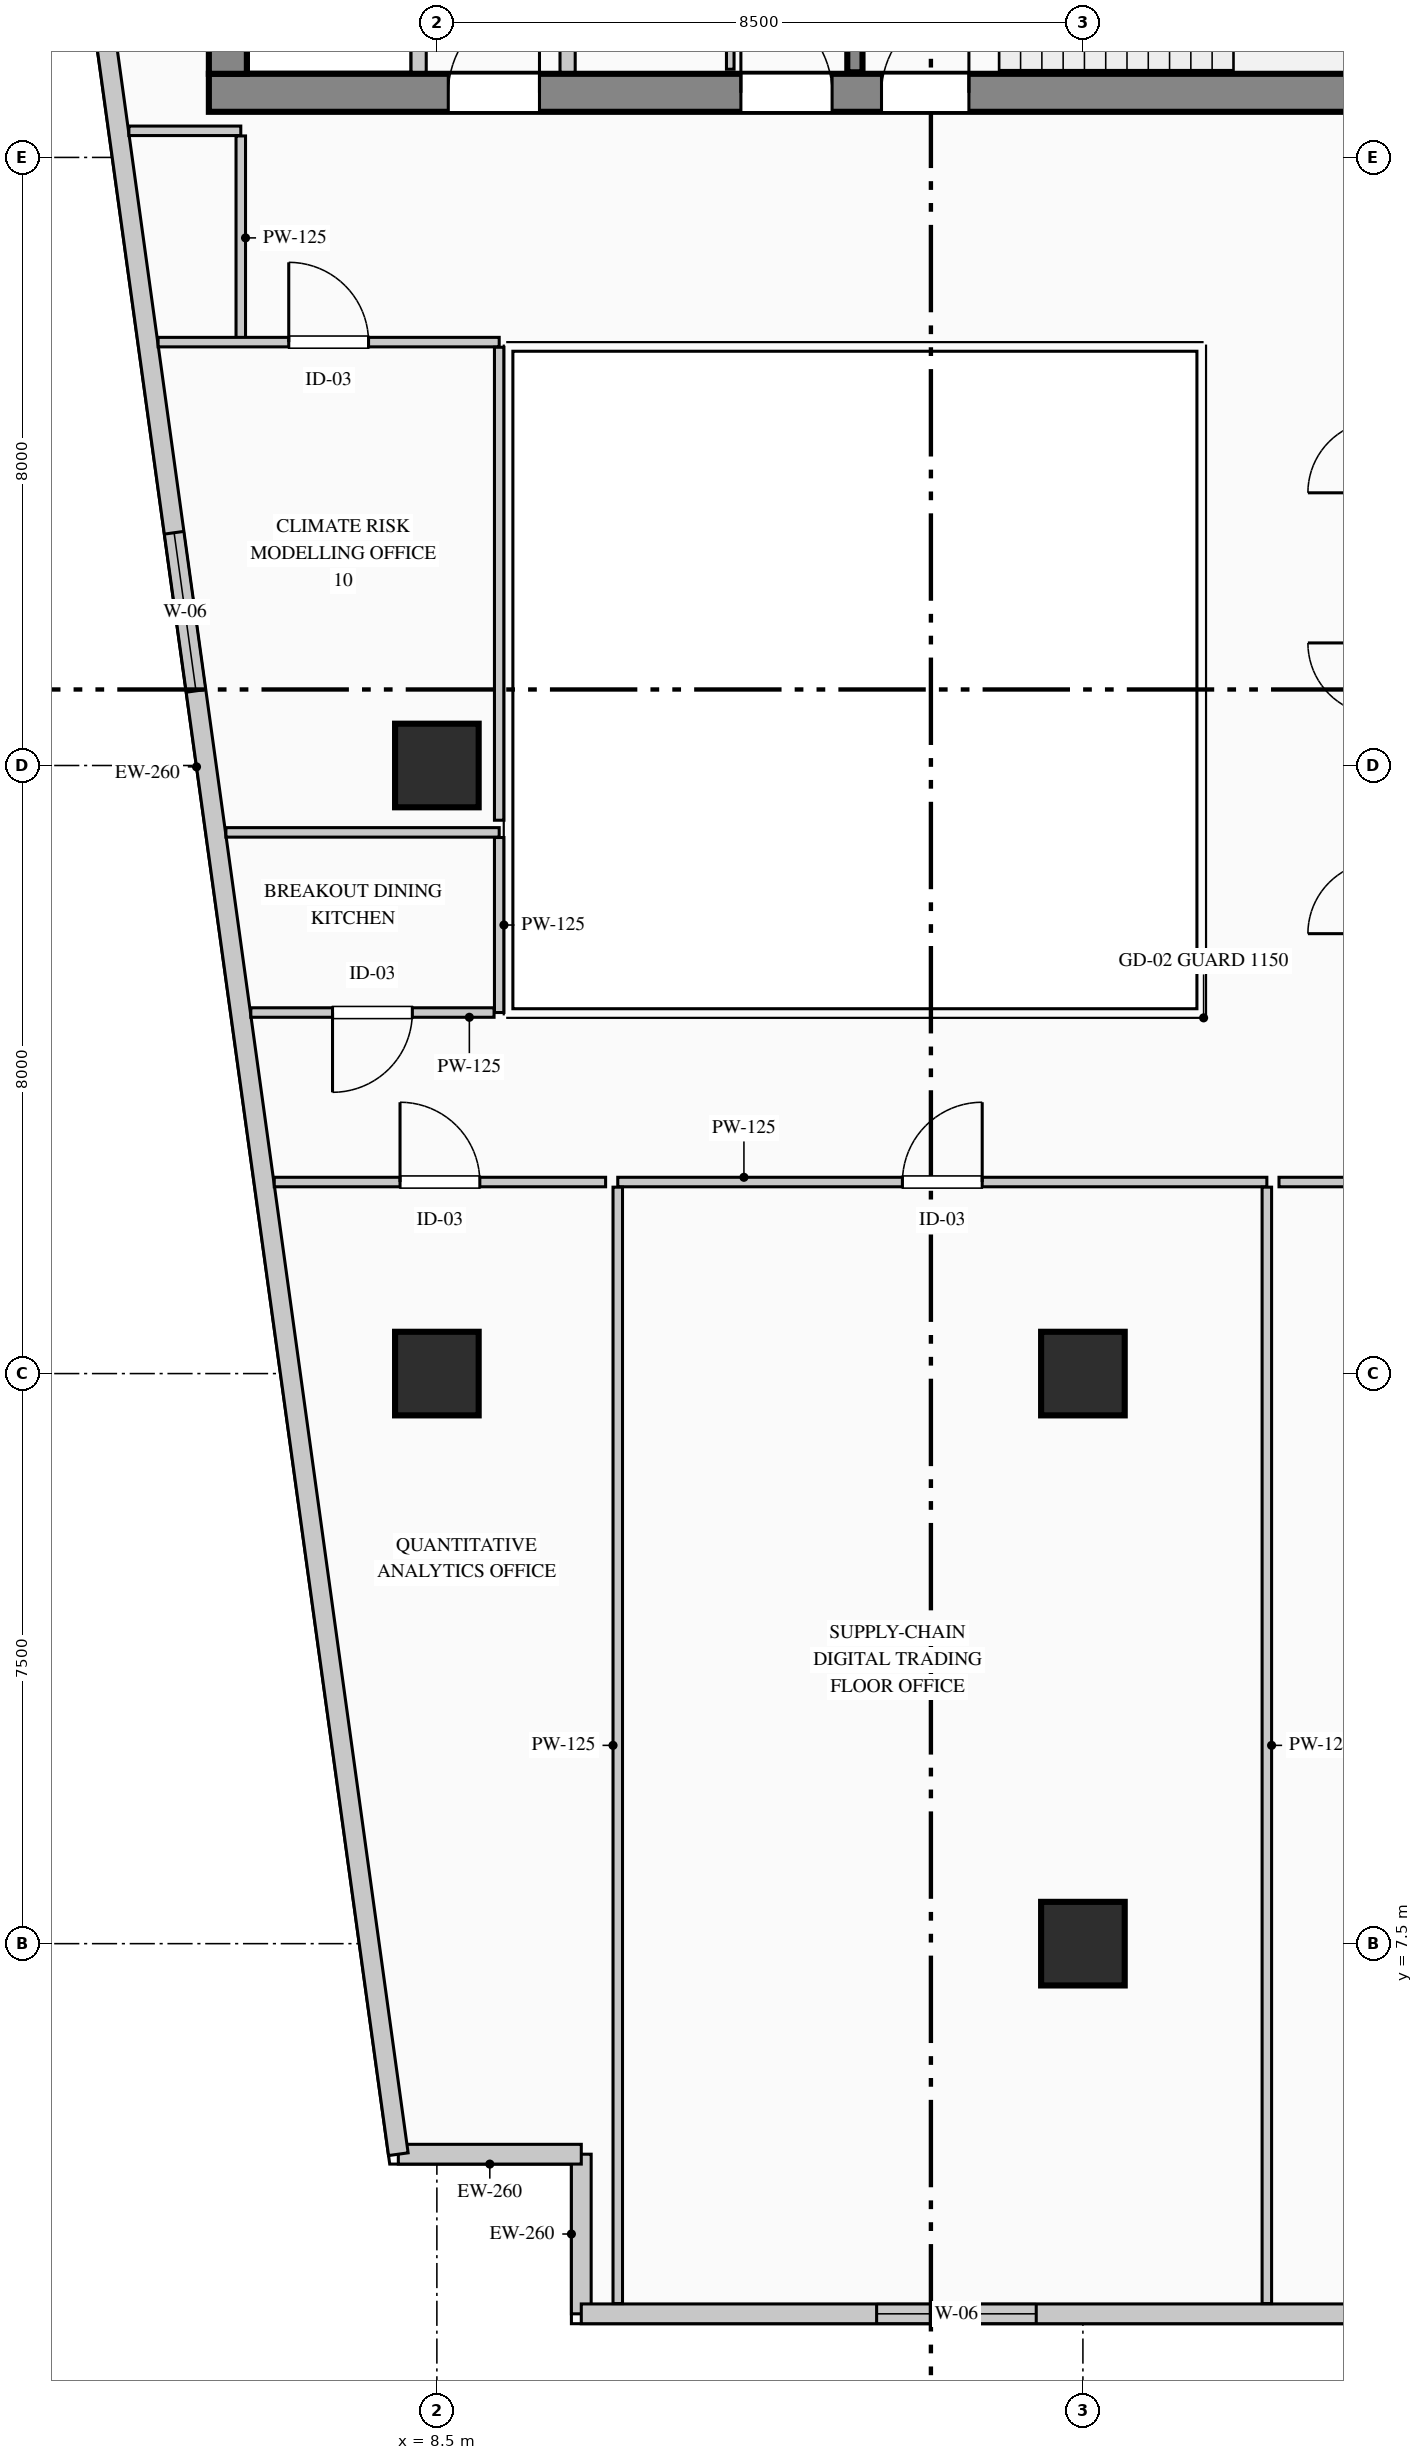
"""IFC4 building model, lengths in metres.
Left out: names, types, materials, properties, quantities, classifications, styles, units other than length and angle.
Written with IfcOpenShell. Run it as: python <this file> out.ifc"""

import sys

from ifc_helpers import new_model, si_unit, direction, frame, frame_2d, origin, origin_2d, place, context, subcontext, project, spatial, rectangle, extrude, element, fill, save


model = new_model("IFC4")
c1 = context("Model", 3, precision=1e-05, world=origin(), true_north=direction((0.0, 1.0)))
c2 = subcontext(c1, "Body", "Model", "MODEL_VIEW")
j1 = project(units=[si_unit("LENGTHUNIT", "METRE"), si_unit("PLANEANGLEUNIT", "RADIAN")], contexts=[c1])
p1 = place(None, origin())
s1 = spatial("IfcSite", under=j1, at=p1, CompositionType="ELEMENT")
p2 = place(p1, origin())
s2 = spatial("IfcBuilding", under=s1, at=p2, CompositionType="ELEMENT")
p3 = place(p2, frame((0.0, 0.0, 154.85)))
s3 = spatial("IfcBuildingStorey", under=s2, at=p3, CompositionType="ELEMENT", Elevation=154.85)
p4 = place(p3, frame((5.5, 31.85, 0.0), z_axis=(0.0, 0.0, 1.0), x_axis=(1.0, 0.0, 0.0)))
e1 = element("IfcWall", 1, at=p4, inside=s3, PredefinedType="SHEAR", context=c2, shape_type="SweptSolid", body=[
    extrude(rectangle(XDim=17.85, YDim=0.5, at=frame_2d((8.925, 0.0))), origin(), (0.0, 0.0, 1.0), 3.95),
])
p5 = place(p4, frame((3.15, 0.0, 0.0)))
e2 = element("IfcOpeningElement", 2, at=p5, cuts=e1, PredefinedType="OPENING", context=c2, shape_type="SweptSolid", body=[
    extrude(rectangle(XDim=1.2, YDim=2.2, at=frame_2d((0.6, 1.1))), frame((0.0, 0.26, 0.0), z_axis=(0.0, -1.0, 0.0), x_axis=(1.0, 0.0, 0.0)), (0.0, 0.0, 1.0), 0.52),
])
p6 = place(p4, frame((7.0, 0.0, 0.0)))
e3 = element("IfcOpeningElement", 3, at=p6, cuts=e1, PredefinedType="OPENING", context=c2, shape_type="SweptSolid", body=[
    extrude(rectangle(XDim=1.2, YDim=2.2, at=frame_2d((0.6, 1.1))), frame((0.0, 0.26, 0.0), z_axis=(0.0, -1.0, 0.0), x_axis=(1.0, 0.0, 0.0)), (0.0, 0.0, 1.0), 0.52),
])
p7 = place(p4, frame((8.85, 0.0, 0.0)))
e4 = element("IfcOpeningElement", 4, at=p7, cuts=e1, PredefinedType="OPENING", context=c2, shape_type="SweptSolid", body=[
    extrude(rectangle(XDim=1.15, YDim=2.2, at=frame_2d((0.575, 1.1))), frame((0.0, 0.26, 0.0), z_axis=(0.0, -1.0, 0.0), x_axis=(1.0, 0.0, 0.0)), (0.0, 0.0, 1.0), 0.52),
])
p8 = place(p4, frame((15.95, 0.0, 0.0)))
e5 = element("IfcOpeningElement", 5, at=p8, cuts=e1, PredefinedType="OPENING", context=c2, shape_type="SweptSolid", body=[
    extrude(rectangle(XDim=1.2, YDim=2.2, at=frame_2d((0.6, 1.1))), frame((0.0, 0.26, 0.0), z_axis=(0.0, -1.0, 0.0), x_axis=(1.0, 0.0, 0.0)), (0.0, 0.0, 1.0), 0.52),
])
p9 = place(p3, frame((5.75, 32.1, 0.0), z_axis=(0.0, 0.0, 1.0), x_axis=(0.0, 1.0, 0.0)))
e6 = element("IfcWall", 6, at=p9, inside=s3, PredefinedType="SHEAR", context=c2, shape_type="SweptSolid", body=[
    extrude(rectangle(XDim=8.3, YDim=0.5, at=frame_2d((4.15, 0.0))), origin(), (0.0, 0.0, 1.0), 3.95),
])
p10 = place(p3, frame((14.0, 32.12, 0.0), z_axis=(0.0, 0.0, 1.0), x_axis=(0.0, 1.0, 0.0)))
e7 = element("IfcWall", 7, at=p10, inside=s3, PredefinedType="SHEAR", context=c2, shape_type="SweptSolid", body=[
    extrude(rectangle(XDim=8.26, YDim=0.2, at=frame_2d((4.13, 0.0))), origin(), (0.0, 0.0, 1.0), 3.95),
])
p11 = place(p10, frame((4.46, 0.0, 0.0)))
e8 = element("IfcOpeningElement", 8, at=p11, cuts=e7, PredefinedType="OPENING", context=c2, shape_type="SweptSolid", body=[
    extrude(rectangle(XDim=1.15, YDim=2.2, at=frame_2d((0.575, 1.1))), frame((0.0, 0.11, 0.0), z_axis=(0.0, -1.0, 0.0), x_axis=(1.0, 0.0, 0.0)), (0.0, 0.0, 1.0), 0.22),
])
for number, where, z_axis, x_axis in (
    (9, (8.5, 15.0, 0.0), (0.0, 0.0, 1.0), (1.0, 0.0, 0.0)),
    (10, (8.5, 23.0, 0.0), (0.0, 0.0, 1.0), (1.0, 0.0, 0.0)),
    (11, (17.0, 7.5, 0.0), (0.0, 0.0, 1.0), (1.0, 0.0, 0.0)),
    (12, (17.0, 15.0, 0.0), (0.0, 0.0, 1.0), (1.0, 0.0, 0.0)),
):
    element("IfcColumn", number, at=place(p3, frame(where, z_axis=z_axis, x_axis=x_axis)), inside=s3, PredefinedType="COLUMN", context=c2, shape_type="SweptSolid", body=[
        extrude(rectangle(XDim=1.1, YDim=1.1, at=origin_2d()), origin(), (0.0, 0.0, 1.0), 3.95),
    ])
p12 = place(p3, frame((10.4, 2.63, 0.0), z_axis=(0.0, 0.0, 1.0), x_axis=(0.0, 1.0, 0.0)))
e13 = element("IfcWall", 13, at=p12, inside=s3, PredefinedType="STANDARD", context=c2, shape_type="SweptSolid", body=[
    extrude(rectangle(XDim=2.1, YDim=0.26, at=frame_2d((1.05, 0.0))), origin(), (0.0, 0.0, 1.0), 3.69),
])
p13 = place(p3, frame((10.4, 4.73, 0.0), z_axis=(0.0, 0.0, 1.0), x_axis=(-1.0, 0.0, 0.0)))
e14 = element("IfcWall", 14, at=p13, inside=s3, PredefinedType="STANDARD", context=c2, shape_type="SweptSolid", body=[
    extrude(rectangle(XDim=2.407, YDim=0.26, at=frame_2d((1.204, 0.0))), origin(), (0.0, 0.0, 1.0), 3.69),
])
p14 = place(p3, frame((7.993, 4.73, 0.0), z_axis=(0.0, 0.0, 1.0), x_axis=(-0.136989009016, 0.990572567462, 0.0)))
e15 = element("IfcWall", 15, at=p14, inside=s3, PredefinedType="STANDARD", context=c2, shape_type="SweptSolid", body=[
    extrude(rectangle(XDim=36.888, YDim=0.26, at=frame_2d((18.444, 0.0))), origin(), (0.0, 0.0, 1.0), 3.69),
])
p15 = place(p14, frame((19.435, 0.0, 0.9)))
e16 = element("IfcOpeningElement", 16, at=p15, cuts=e15, PredefinedType="OPENING", context=c2, shape_type="SweptSolid", body=[
    extrude(rectangle(XDim=2.1, YDim=2.0, at=frame_2d((1.05, 1.0))), frame((0.0, 0.14, 0.0), z_axis=(0.0, -1.0, 0.0), x_axis=(1.0, 0.0, 0.0)), (0.0, 0.0, 1.0), 0.28),
])
p16 = place(p3, frame((24.11, 2.63, 0.0), z_axis=(0.0, 0.0, 1.0), x_axis=(-1.0, 0.0, 0.0)))
e17 = element("IfcWall", 17, at=p16, inside=s3, PredefinedType="STANDARD", context=c2, shape_type="SweptSolid", body=[
    extrude(rectangle(XDim=13.71, YDim=0.26, at=frame_2d((6.855, 0.0))), origin(), (0.0, 0.0, 1.0), 3.69),
])
p17 = place(p16, frame((7.724, 0.0, 0.9)))
e18 = element("IfcOpeningElement", 18, at=p17, cuts=e17, PredefinedType="OPENING", context=c2, shape_type="SweptSolid", body=[
    extrude(rectangle(XDim=2.1, YDim=2.0, at=frame_2d((1.05, 1.0))), frame((0.0, 0.14, 0.0), z_axis=(0.0, -1.0, 0.0), x_axis=(1.0, 0.0, 0.0)), (0.0, 0.0, 1.0), 0.28),
])
p18 = place(p3, frame((8.26, 32.12, 0.0), z_axis=(0.0, 0.0, 1.0), x_axis=(0.0, 1.0, 0.0)))
e19 = element("IfcWall", 19, at=p18, inside=s3, PredefinedType="PARTITIONING", context=c2, shape_type="SweptSolid", body=[
    extrude(rectangle(XDim=7.5, YDim=0.2, at=frame_2d((3.75, 0.0))), origin(), (0.0, 0.0, 1.0), 3.69),
])
p19 = place(p3, frame((10.22, 32.12, 0.0), z_axis=(0.0, 0.0, 1.0), x_axis=(0.0, 1.0, 0.0)))
e20 = element("IfcWall", 20, at=p19, inside=s3, PredefinedType="PARTITIONING", context=c2, shape_type="SweptSolid", body=[
    extrude(rectangle(XDim=8.26, YDim=0.2, at=frame_2d((4.13, 0.0))), origin(), (0.0, 0.0, 1.0), 3.69),
])
p20 = place(p3, frame((12.36, 32.16, 0.0), z_axis=(0.0, 0.0, 1.0), x_axis=(0.0, 1.0, 0.0)))
e21 = element("IfcWall", 21, at=p20, inside=s3, PredefinedType="PARTITIONING", context=c2, shape_type="SweptSolid", body=[
    extrude(rectangle(XDim=1.62, YDim=0.1, at=frame_2d((0.81, 0.0))), origin(), (0.0, 0.0, 1.0), 3.69),
])
p21 = place(p20, frame((0.38, 0.0, 0.0)))
e22 = element("IfcOpeningElement", 22, at=p21, cuts=e21, PredefinedType="OPENING", context=c2, shape_type="SweptSolid", body=[
    extrude(rectangle(XDim=0.85, YDim=2.1, at=frame_2d((0.425, 1.05))), frame((0.0, 0.06, 0.0), z_axis=(0.0, -1.0, 0.0), x_axis=(1.0, 0.0, 0.0)), (0.0, 0.0, 1.0), 0.12),
])
p22 = place(p3, frame((10.88, 17.52, 0.0), z_axis=(0.0, 0.0, 1.0), x_axis=(1.0, 0.0, 0.0)))
e23 = element("IfcWall", 23, at=p22, inside=s3, PredefinedType="PARTITIONING", context=c2, shape_type="SweptSolid", body=[
    extrude(rectangle(XDim=8.54, YDim=0.125, at=frame_2d((4.27, 0.0))), origin(), (0.0, 0.0, 1.0), 3.69),
])
p23 = place(p22, frame((3.745, 0.0, 0.0)))
e24 = element("IfcOpeningElement", 24, at=p23, cuts=e23, PredefinedType="OPENING", context=c2, shape_type="SweptSolid", body=[
    extrude(rectangle(XDim=1.05, YDim=2.15, at=frame_2d((0.525, 1.075))), frame((0.0, 0.073, 0.0), z_axis=(0.0, -1.0, 0.0), x_axis=(1.0, 0.0, 0.0)), (0.0, 0.0, 1.0), 0.145),
])
for number, where, z_axis, x_axis in (
    (25, (19.42, 17.452, 0.0), (0.0, 0.0, 1.0), (0.0, -1.0, 0.0)),
    (26, (10.88, 2.765, 0.0), (0.0, 0.0, 1.0), (0.0, 1.0, 0.0)),
):
    element("IfcWall", number, at=place(p3, frame(where, z_axis=z_axis, x_axis=x_axis)), inside=s3, PredefinedType="PARTITIONING", context=c2, shape_type="SweptSolid", body=[
        extrude(rectangle(XDim=14.688, YDim=0.125, at=frame_2d((7.344, 0.0))), origin(), (0.0, 0.0, 1.0), 3.69),
    ])
p24 = place(p3, frame((19.58, 17.52, 0.0), z_axis=(0.0, 0.0, 1.0), x_axis=(1.0, 0.0, 0.0)))
e27 = element("IfcWall", 27, at=p24, inside=s3, PredefinedType="PARTITIONING", context=c2, shape_type="SweptSolid", body=[
    extrude(rectangle(XDim=8.34, YDim=0.125, at=frame_2d((4.17, 0.0))), origin(), (0.0, 0.0, 1.0), 3.475),
])
p25 = place(p24, frame((3.645, 0.0, 0.0)))
e28 = element("IfcOpeningElement", 28, at=p25, cuts=e27, PredefinedType="OPENING", context=c2, shape_type="SweptSolid", body=[
    extrude(rectangle(XDim=1.05, YDim=2.15, at=frame_2d((0.525, 1.075))), frame((0.0, 0.073, 0.0), z_axis=(0.0, -1.0, 0.0), x_axis=(1.0, 0.0, 0.0)), (0.0, 0.0, 1.0), 0.145),
])
p26 = place(p3, frame((6.36, 17.52, 0.0), z_axis=(0.0, 0.0, 1.0), x_axis=(1.0, 0.0, 0.0)))
e29 = element("IfcWall", 29, at=p26, inside=s3, PredefinedType="PARTITIONING", context=c2, shape_type="SweptSolid", body=[
    extrude(rectangle(XDim=4.36, YDim=0.125, at=frame_2d((2.18, 0.0))), origin(), (0.0, 0.0, 1.0), 3.69),
])
p27 = place(p26, frame((1.655, 0.0, 0.0)))
e30 = element("IfcOpeningElement", 30, at=p27, cuts=e29, PredefinedType="OPENING", context=c2, shape_type="SweptSolid", body=[
    extrude(rectangle(XDim=1.05, YDim=2.15, at=frame_2d((0.525, 1.075))), frame((0.0, 0.073, 0.0), z_axis=(0.0, -1.0, 0.0), x_axis=(1.0, 0.0, 0.0)), (0.0, 0.0, 1.0), 0.145),
])
p28 = place(p3, frame((5.724, 22.12, 0.0), z_axis=(0.0, 0.0, 1.0), x_axis=(1.0, 0.0, 0.0)))
e31 = element("IfcWall", 31, at=p28, inside=s3, PredefinedType="PARTITIONING", context=c2, shape_type="SweptSolid", body=[
    extrude(rectangle(XDim=3.596, YDim=0.125, at=frame_2d((1.798, 0.0))), origin(), (0.0, 0.0, 1.0), 3.69),
])
p29 = place(p3, frame((9.32, 22.052, 0.0), z_axis=(0.0, 0.0, 1.0), x_axis=(0.0, -1.0, 0.0)))
e32 = element("IfcWall", 32, at=p29, inside=s3, PredefinedType="PARTITIONING", context=c2, shape_type="SweptSolid", body=[
    extrude(rectangle(XDim=2.302, YDim=0.125, at=frame_2d((1.151, 0.0))), origin(), (0.0, 0.0, 1.0), 3.315),
])
p30 = place(p3, frame((9.252, 19.75, 0.0), z_axis=(0.0, 0.0, 1.0), x_axis=(-1.0, 0.0, 0.0)))
e33 = element("IfcWall", 33, at=p30, inside=s3, PredefinedType="PARTITIONING", context=c2, shape_type="SweptSolid", body=[
    extrude(rectangle(XDim=3.2, YDim=0.125, at=frame_2d((1.6, 0.0))), origin(), (0.0, 0.0, 1.0), 3.69),
])
p31 = place(p30, frame((1.075, 0.0, 0.0)))
e34 = element("IfcOpeningElement", 34, at=p31, cuts=e33, PredefinedType="OPENING", context=c2, shape_type="SweptSolid", body=[
    extrude(rectangle(XDim=1.05, YDim=2.15, at=frame_2d((0.525, 1.075))), frame((0.0, 0.073, 0.0), z_axis=(0.0, -1.0, 0.0), x_axis=(1.0, 0.0, 0.0)), (0.0, 0.0, 1.0), 0.145),
])
p32 = place(p3, frame((4.448, 31.35, 0.0), z_axis=(0.0, 0.0, 1.0), x_axis=(1.0, 0.0, 0.0)))
e35 = element("IfcWall", 35, at=p32, inside=s3, PredefinedType="PARTITIONING", context=c2, shape_type="SweptSolid", body=[
    extrude(rectangle(XDim=1.472, YDim=0.125, at=frame_2d((0.736, 0.0))), origin(), (0.0, 0.0, 1.0), 3.69),
])
p33 = place(p3, frame((5.92, 31.282, 0.0), z_axis=(0.0, 0.0, 1.0), x_axis=(0.0, -1.0, 0.0)))
e36 = element("IfcWall", 36, at=p33, inside=s3, PredefinedType="PARTITIONING", context=c2, shape_type="SweptSolid", body=[
    extrude(rectangle(XDim=2.682, YDim=0.125, at=frame_2d((1.341, 0.0))), origin(), (0.0, 0.0, 1.0), 3.69),
])
p34 = place(p3, frame((4.832, 28.57, 0.0), z_axis=(0.0, 0.0, 1.0), x_axis=(1.0, 0.0, 0.0)))
e37 = element("IfcWall", 37, at=p34, inside=s3, PredefinedType="PARTITIONING", context=c2, shape_type="SweptSolid", body=[
    extrude(rectangle(XDim=4.488, YDim=0.125, at=frame_2d((2.244, 0.0))), origin(), (0.0, 0.0, 1.0), 3.69),
])
p35 = place(p34, frame((1.719, 0.0, 0.0)))
e38 = element("IfcOpeningElement", 38, at=p35, cuts=e37, PredefinedType="OPENING", context=c2, shape_type="SweptSolid", body=[
    extrude(rectangle(XDim=1.05, YDim=2.15, at=frame_2d((0.525, 1.075))), frame((0.0, 0.073, 0.0), z_axis=(0.0, -1.0, 0.0), x_axis=(1.0, 0.0, 0.0)), (0.0, 0.0, 1.0), 0.145),
])
p36 = place(p3, frame((9.32, 28.502, 0.0), z_axis=(0.0, 0.0, 1.0), x_axis=(0.0, -1.0, 0.0)))
e39 = element("IfcWall", 39, at=p36, inside=s3, PredefinedType="PARTITIONING", context=c2, shape_type="SweptSolid", body=[
    extrude(rectangle(XDim=6.222, YDim=0.125, at=frame_2d((3.111, 0.0))), origin(), (0.0, 0.0, 1.0), 3.315),
])
p37 = place(p15, origin())
e40 = element("IfcWindow", 40, at=p37, inside=s3, PartitioningType="DOUBLE_PANEL_VERTICAL", PredefinedType="WINDOW", context=c2, shape_type="SweptSolid", body=[
    extrude(rectangle(XDim=2.1, YDim=2.0, at=frame_2d((1.05, 1.0))), frame((0.0, 0.03, 0.0), z_axis=(0.0, -1.0, 0.0), x_axis=(1.0, 0.0, 0.0)), (0.0, 0.0, 1.0), 0.06),
])
fill(e16, e40)
p38 = place(p17, origin())
e41 = element("IfcWindow", 41, at=p38, inside=s3, PartitioningType="DOUBLE_PANEL_VERTICAL", PredefinedType="WINDOW", context=c2, shape_type="SweptSolid", body=[
    extrude(rectangle(XDim=2.1, YDim=2.0, at=frame_2d((1.05, 1.0))), frame((0.0, 0.03, 0.0), z_axis=(0.0, -1.0, 0.0), x_axis=(1.0, 0.0, 0.0)), (0.0, 0.0, 1.0), 0.06),
])
fill(e18, e41)
p39 = place(p5, origin())
e42 = element("IfcDoor", 42, at=p39, inside=s3, OperationType="SINGLE_SWING_RIGHT", PredefinedType="DOOR", context=c2, shape_type="SweptSolid", body=[
    extrude(rectangle(XDim=1.2, YDim=2.2, at=frame_2d((0.6, 1.1))), frame((0.0, 0.025, 0.0), z_axis=(0.0, -1.0, 0.0), x_axis=(1.0, 0.0, 0.0)), (0.0, 0.0, 1.0), 0.05),
])
fill(e2, e42)
p40 = place(p6, origin())
e43 = element("IfcDoor", 43, at=p40, inside=s3, OperationType="SINGLE_SWING_LEFT", PredefinedType="DOOR", context=c2, shape_type="SweptSolid", body=[
    extrude(rectangle(XDim=1.2, YDim=2.2, at=frame_2d((0.6, 1.1))), frame((0.0, 0.025, 0.0), z_axis=(0.0, -1.0, 0.0), x_axis=(1.0, 0.0, 0.0)), (0.0, 0.0, 1.0), 0.05),
])
fill(e3, e43)
p41 = place(p7, origin())
e44 = element("IfcDoor", 44, at=p41, inside=s3, OperationType="SINGLE_SWING_RIGHT", PredefinedType="DOOR", context=c2, shape_type="SweptSolid", body=[
    extrude(rectangle(XDim=1.15, YDim=2.2, at=frame_2d((0.575, 1.1))), frame((0.0, 0.025, 0.0), z_axis=(0.0, -1.0, 0.0), x_axis=(1.0, 0.0, 0.0)), (0.0, 0.0, 1.0), 0.05),
])
fill(e4, e44)
p42 = place(p23, origin())
e45 = element("IfcDoor", 45, at=p42, inside=s3, OperationType="SINGLE_SWING_RIGHT", PredefinedType="DOOR", context=c2, shape_type="SweptSolid", body=[
    extrude(rectangle(XDim=1.05, YDim=2.15, at=frame_2d((0.525, 1.075))), frame((0.0, 0.025, 0.0), z_axis=(0.0, -1.0, 0.0), x_axis=(1.0, 0.0, 0.0)), (0.0, 0.0, 1.0), 0.05),
])
fill(e24, e45)
p43 = place(p27, origin())
e46 = element("IfcDoor", 46, at=p43, inside=s3, OperationType="SINGLE_SWING_LEFT", PredefinedType="DOOR", context=c2, shape_type="SweptSolid", body=[
    extrude(rectangle(XDim=1.05, YDim=2.15, at=frame_2d((0.525, 1.075))), frame((0.0, 0.025, 0.0), z_axis=(0.0, -1.0, 0.0), x_axis=(1.0, 0.0, 0.0)), (0.0, 0.0, 1.0), 0.05),
])
fill(e30, e46)
p44 = place(p31, origin())
e47 = element("IfcDoor", 47, at=p44, inside=s3, OperationType="SINGLE_SWING_RIGHT", PredefinedType="DOOR", context=c2, shape_type="SweptSolid", body=[
    extrude(rectangle(XDim=1.05, YDim=2.15, at=frame_2d((0.525, 1.075))), frame((0.0, 0.025, 0.0), z_axis=(0.0, -1.0, 0.0), x_axis=(1.0, 0.0, 0.0)), (0.0, 0.0, 1.0), 0.05),
])
fill(e34, e47)
p45 = place(p35, origin())
e48 = element("IfcDoor", 48, at=p45, inside=s3, OperationType="SINGLE_SWING_LEFT", PredefinedType="DOOR", context=c2, shape_type="SweptSolid", body=[
    extrude(rectangle(XDim=1.05, YDim=2.15, at=frame_2d((0.525, 1.075))), frame((0.0, 0.025, 0.0), z_axis=(0.0, -1.0, 0.0), x_axis=(1.0, 0.0, 0.0)), (0.0, 0.0, 1.0), 0.05),
])
fill(e38, e48)
save(model, sys.argv[1])
